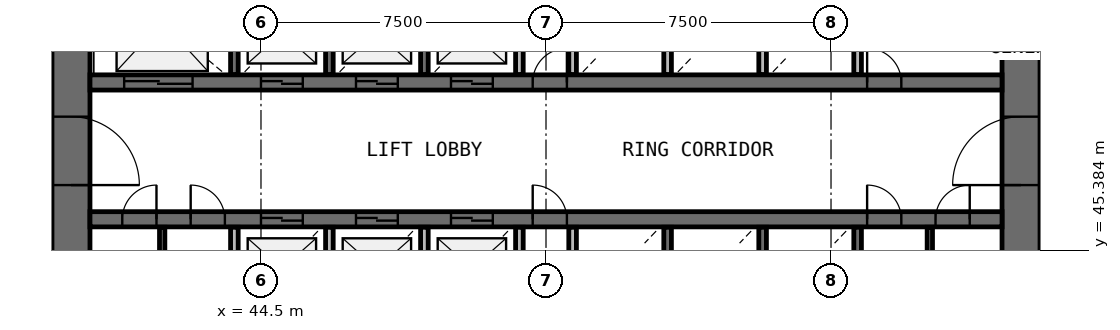
"""IFC4 building model, lengths in metres.
Left out: names, types, materials, properties, quantities, classifications, styles, units other than length and angle.
Written with IfcOpenShell. Run it as: python <this file> out.ifc"""

import sys

from ifc_helpers import new_model, si_unit, direction, frame, frame_2d, origin, place, context, subcontext, project, spatial, rectangle, extrude, source, transform, mapped, element, fill, save


model = new_model("IFC4")
c1 = context("Model", 3, precision=1e-05, world=origin(), true_north=direction((0.0, 1.0)))
c2 = subcontext(c1, "Body", "Model", "MODEL_VIEW")
j1 = project(units=[si_unit("LENGTHUNIT", "METRE"), si_unit("PLANEANGLEUNIT", "RADIAN")], contexts=[c1])
p1 = place(None, origin())
s1 = spatial("IfcSite", under=j1, at=p1, CompositionType="ELEMENT")
p2 = place(p1, origin())
s2 = spatial("IfcBuilding", under=s1, at=p2, CompositionType="ELEMENT")
p3 = place(p2, frame((0.0, 0.0, 57.8)))
s3 = spatial("IfcBuildingStorey", under=s2, at=p3, CompositionType="ELEMENT", Elevation=57.8)
p4 = place(p3, frame((64.5, 38.0, 0.0), z_axis=(0.0, 0.0, 1.0), x_axis=(0.0, 1.0, 0.0)))
e1 = element("IfcWall", 1, at=p4, inside=s3, PredefinedType="SHEAR", context=c2, shape_type="SweptSolid", body=[
    extrude(rectangle(XDim=20.0, YDim=1.0, at=frame_2d((10.0, 0.0))), origin(), (0.0, 0.0, 1.0), 4.4),
])
p5 = place(p4, frame((9.1, 0.0, 0.0)))
e2 = element("IfcOpeningElement", 2, at=p5, cuts=e1, PredefinedType="OPENING", context=c2, shape_type="SweptSolid", body=[
    extrude(rectangle(XDim=1.8, YDim=2.1, at=frame_2d((0.9, 1.05))), frame((0.0, 0.51, 0.0), z_axis=(0.0, -1.0, 0.0), x_axis=(1.0, 0.0, 0.0)), (0.0, 0.0, 1.0), 1.02),
])
p6 = place(p3, frame((39.5, 58.0, 0.0), z_axis=(0.0, 0.0, 1.0), x_axis=(0.0, -1.0, 0.0)))
e3 = element("IfcWall", 3, at=p6, inside=s3, PredefinedType="SHEAR", context=c2, shape_type="SweptSolid", body=[
    extrude(rectangle(XDim=20.0, YDim=1.0, at=frame_2d((10.0, 0.0))), origin(), (0.0, 0.0, 1.0), 4.4),
])
p7 = place(p6, frame((9.1, 0.0, 0.0)))
e4 = element("IfcOpeningElement", 4, at=p7, cuts=e3, PredefinedType="OPENING", context=c2, shape_type="SweptSolid", body=[
    extrude(rectangle(XDim=1.8, YDim=2.1, at=frame_2d((0.9, 1.05))), frame((0.0, 0.51, 0.0), z_axis=(0.0, -1.0, 0.0), x_axis=(1.0, 0.0, 0.0)), (0.0, 0.0, 1.0), 1.02),
])
p8 = place(p3, frame((40.0, 49.8, 0.0), z_axis=(0.0, 0.0, 1.0), x_axis=(1.0, 0.0, 0.0)))
e5 = element("IfcWall", 5, at=p8, inside=s3, PredefinedType="SHEAR", context=c2, shape_type="SweptSolid", body=[
    extrude(rectangle(XDim=24.0, YDim=0.4, at=frame_2d((12.0, 0.0))), origin(), (0.0, 0.0, 1.0), 4.4),
])
p9 = place(p8, frame((4.5, 0.0, 0.0)))
e6 = element("IfcOpeningElement", 6, at=p9, cuts=e5, PredefinedType="OPENING", context=c2, shape_type="SweptSolid", body=[
    extrude(rectangle(XDim=1.1, YDim=2.1, at=frame_2d((0.55, 1.05))), frame((0.0, 0.21, 0.0), z_axis=(0.0, -1.0, 0.0), x_axis=(1.0, 0.0, 0.0)), (0.0, 0.0, 1.0), 0.42),
])
p10 = place(p8, frame((7.0, 0.0, 0.0)))
e7 = element("IfcOpeningElement", 7, at=p10, cuts=e5, PredefinedType="OPENING", context=c2, shape_type="SweptSolid", body=[
    extrude(rectangle(XDim=1.1, YDim=2.1, at=frame_2d((0.55, 1.05))), frame((0.0, 0.21, 0.0), z_axis=(0.0, -1.0, 0.0), x_axis=(1.0, 0.0, 0.0)), (0.0, 0.0, 1.0), 0.42),
])
p11 = place(p8, frame((9.5, 0.0, 0.0)))
e8 = element("IfcOpeningElement", 8, at=p11, cuts=e5, PredefinedType="OPENING", context=c2, shape_type="SweptSolid", body=[
    extrude(rectangle(XDim=1.1, YDim=2.1, at=frame_2d((0.55, 1.05))), frame((0.0, 0.21, 0.0), z_axis=(0.0, -1.0, 0.0), x_axis=(1.0, 0.0, 0.0)), (0.0, 0.0, 1.0), 0.42),
])
p12 = place(p8, frame((0.9, 0.0, 0.0)))
e9 = element("IfcOpeningElement", 9, at=p12, cuts=e5, PredefinedType="OPENING", context=c2, shape_type="SweptSolid", body=[
    extrude(rectangle(XDim=1.8, YDim=2.4, at=frame_2d((0.9, 1.2))), frame((0.0, 0.21, 0.0), z_axis=(0.0, -1.0, 0.0), x_axis=(1.0, 0.0, 0.0)), (0.0, 0.0, 1.0), 0.42),
])
p13 = place(p8, frame((20.45, 0.0, 0.0)))
e10 = element("IfcOpeningElement", 10, at=p13, cuts=e5, PredefinedType="OPENING", context=c2, shape_type="SweptSolid", body=[
    extrude(rectangle(XDim=0.9, YDim=2.1, at=frame_2d((0.45, 1.05))), frame((0.0, 0.21, 0.0), z_axis=(0.0, -1.0, 0.0), x_axis=(1.0, 0.0, 0.0)), (0.0, 0.0, 1.0), 0.42),
])
p14 = place(p8, frame((11.65, 0.0, 0.0)))
e11 = element("IfcOpeningElement", 11, at=p14, cuts=e5, PredefinedType="OPENING", context=c2, shape_type="SweptSolid", body=[
    extrude(rectangle(XDim=0.9, YDim=2.1, at=frame_2d((0.45, 1.05))), frame((0.0, 0.21, 0.0), z_axis=(0.0, -1.0, 0.0), x_axis=(1.0, 0.0, 0.0)), (0.0, 0.0, 1.0), 0.42),
])
p15 = place(p3, frame((40.0, 46.2, 0.0), z_axis=(0.0, 0.0, 1.0), x_axis=(1.0, 0.0, 0.0)))
e12 = element("IfcWall", 12, at=p15, inside=s3, PredefinedType="SHEAR", context=c2, shape_type="SweptSolid", body=[
    extrude(rectangle(XDim=24.0, YDim=0.4, at=frame_2d((12.0, 0.0))), origin(), (0.0, 0.0, 1.0), 4.4),
])
p16 = place(p15, frame((4.5, 0.0, 0.0)))
e13 = element("IfcOpeningElement", 13, at=p16, cuts=e12, PredefinedType="OPENING", context=c2, shape_type="SweptSolid", body=[
    extrude(rectangle(XDim=1.1, YDim=2.1, at=frame_2d((0.55, 1.05))), frame((0.0, 0.21, 0.0), z_axis=(0.0, -1.0, 0.0), x_axis=(1.0, 0.0, 0.0)), (0.0, 0.0, 1.0), 0.42),
])
p17 = place(p15, frame((7.0, 0.0, 0.0)))
e14 = element("IfcOpeningElement", 14, at=p17, cuts=e12, PredefinedType="OPENING", context=c2, shape_type="SweptSolid", body=[
    extrude(rectangle(XDim=1.1, YDim=2.1, at=frame_2d((0.55, 1.05))), frame((0.0, 0.21, 0.0), z_axis=(0.0, -1.0, 0.0), x_axis=(1.0, 0.0, 0.0)), (0.0, 0.0, 1.0), 0.42),
])
p18 = place(p15, frame((9.5, 0.0, 0.0)))
e15 = element("IfcOpeningElement", 15, at=p18, cuts=e12, PredefinedType="OPENING", context=c2, shape_type="SweptSolid", body=[
    extrude(rectangle(XDim=1.1, YDim=2.1, at=frame_2d((0.55, 1.05))), frame((0.0, 0.21, 0.0), z_axis=(0.0, -1.0, 0.0), x_axis=(1.0, 0.0, 0.0)), (0.0, 0.0, 1.0), 0.42),
])
p19 = place(p15, frame((20.45, 0.0, 0.0)))
e16 = element("IfcOpeningElement", 16, at=p19, cuts=e12, PredefinedType="OPENING", context=c2, shape_type="SweptSolid", body=[
    extrude(rectangle(XDim=0.9, YDim=2.1, at=frame_2d((0.45, 1.05))), frame((0.0, 0.21, 0.0), z_axis=(0.0, -1.0, 0.0), x_axis=(1.0, 0.0, 0.0)), (0.0, 0.0, 1.0), 0.42),
])
p20 = place(p15, frame((22.25, 0.0, 0.0)))
e17 = element("IfcOpeningElement", 17, at=p20, cuts=e12, PredefinedType="OPENING", context=c2, shape_type="SweptSolid", body=[
    extrude(rectangle(XDim=0.9, YDim=2.1, at=frame_2d((0.45, 1.05))), frame((0.0, 0.21, 0.0), z_axis=(0.0, -1.0, 0.0), x_axis=(1.0, 0.0, 0.0)), (0.0, 0.0, 1.0), 0.42),
])
p21 = place(p15, frame((0.85, 0.0, 0.0)))
e18 = element("IfcOpeningElement", 18, at=p21, cuts=e12, PredefinedType="OPENING", context=c2, shape_type="SweptSolid", body=[
    extrude(rectangle(XDim=0.9, YDim=2.1, at=frame_2d((0.45, 1.05))), frame((0.0, 0.21, 0.0), z_axis=(0.0, -1.0, 0.0), x_axis=(1.0, 0.0, 0.0)), (0.0, 0.0, 1.0), 0.42),
])
p22 = place(p15, frame((2.65, 0.0, 0.0)))
e19 = element("IfcOpeningElement", 19, at=p22, cuts=e12, PredefinedType="OPENING", context=c2, shape_type="SweptSolid", body=[
    extrude(rectangle(XDim=0.9, YDim=2.1, at=frame_2d((0.45, 1.05))), frame((0.0, 0.21, 0.0), z_axis=(0.0, -1.0, 0.0), x_axis=(1.0, 0.0, 0.0)), (0.0, 0.0, 1.0), 0.42),
])
p23 = place(p15, frame((11.65, 0.0, 0.0)))
e20 = element("IfcOpeningElement", 20, at=p23, cuts=e12, PredefinedType="OPENING", context=c2, shape_type="SweptSolid", body=[
    extrude(rectangle(XDim=0.9, YDim=2.1, at=frame_2d((0.45, 1.05))), frame((0.0, 0.21, 0.0), z_axis=(0.0, -1.0, 0.0), x_axis=(1.0, 0.0, 0.0)), (0.0, 0.0, 1.0), 0.42),
])
for number, where, z_axis, x_axis in (
    (21, (43.8, 45.99, 0.0), (0.0, 0.0, 1.0), (0.0, -1.0, 0.0)),
    (22, (43.8, 52.37, 0.0), (0.0, 0.0, 1.0), (0.0, -1.0, 0.0)),
):
    element("IfcWall", number, at=place(p3, frame(where, z_axis=z_axis, x_axis=x_axis)), inside=s3, PredefinedType="SOLIDWALL", context=c2, shape_type="SweptSolid", body=[
        extrude(rectangle(XDim=2.36, YDim=0.2, at=frame_2d((1.18, 0.0))), origin(), (0.0, 0.0, 1.0), 3.95),
    ])
p24 = place(p3, frame((46.3, 43.6, 0.0), z_axis=(0.0, 0.0, 1.0), x_axis=(0.0, 1.0, 0.0)))
e23 = element("IfcWall", 23, at=p24, inside=s3, PredefinedType="SOLIDWALL", context=c2, shape_type="SweptSolid", body=[
    extrude(rectangle(XDim=2.39, YDim=0.2, at=frame_2d((1.195, 0.0))), origin(), (0.0, 0.0, 1.0), 3.95),
])
for number, where, z_axis, x_axis in (
    (24, (46.3, 50.01, 0.0), (0.0, 0.0, 1.0), (0.0, 1.0, 0.0)),
    (25, (48.8, 43.63, 0.0), (0.0, 0.0, 1.0), (0.0, 1.0, 0.0)),
    (26, (48.8, 50.01, 0.0), (0.0, 0.0, 1.0), (0.0, 1.0, 0.0)),
    (27, (51.3, 43.63, 0.0), (0.0, 0.0, 1.0), (0.0, 1.0, 0.0)),
):
    element("IfcWall", number, at=place(p3, frame(where, z_axis=z_axis, x_axis=x_axis)), inside=s3, PredefinedType="SOLIDWALL", context=c2, shape_type="SweptSolid", body=[
        extrude(rectangle(XDim=2.36, YDim=0.2, at=frame_2d((1.18, 0.0))), origin(), (0.0, 0.0, 1.0), 3.95),
    ])
for number, where, z_axis, x_axis in (
    (28, (51.3, 50.01, 0.0), (0.0, 0.0, 1.0), (0.0, 1.0, 0.0)),
    (29, (52.7, 45.99, 0.0), (0.0, 0.0, 1.0), (0.0, -1.0, 0.0)),
):
    element("IfcWall", number, at=place(p3, frame(where, z_axis=z_axis, x_axis=x_axis)), inside=s3, PredefinedType="SOLIDWALL", context=c2, shape_type="SweptSolid", body=[
        extrude(rectangle(XDim=2.39, YDim=0.2, at=frame_2d((1.195, 0.0))), origin(), (0.0, 0.0, 1.0), 3.95),
    ])
for number, where, z_axis, x_axis in (
    (30, (52.7, 52.37, 0.0), (0.0, 0.0, 1.0), (0.0, -1.0, 0.0)),
    (31, (55.2, 43.63, 0.0), (0.0, 0.0, 1.0), (0.0, 1.0, 0.0)),
    (32, (55.2, 50.01, 0.0), (0.0, 0.0, 1.0), (0.0, 1.0, 0.0)),
    (33, (57.7, 43.63, 0.0), (0.0, 0.0, 1.0), (0.0, 1.0, 0.0)),
):
    element("IfcWall", number, at=place(p3, frame(where, z_axis=z_axis, x_axis=x_axis)), inside=s3, PredefinedType="SOLIDWALL", context=c2, shape_type="SweptSolid", body=[
        extrude(rectangle(XDim=2.36, YDim=0.2, at=frame_2d((1.18, 0.0))), origin(), (0.0, 0.0, 1.0), 3.95),
    ])
p25 = place(p3, frame((57.7, 50.01, 0.0), z_axis=(0.0, 0.0, 1.0), x_axis=(0.0, 1.0, 0.0)))
e34 = element("IfcWall", 34, at=p25, inside=s3, PredefinedType="SOLIDWALL", context=c2, shape_type="SweptSolid", body=[
    extrude(rectangle(XDim=2.39, YDim=0.2, at=frame_2d((1.195, 0.0))), origin(), (0.0, 0.0, 1.0), 3.95),
])
for number, where, z_axis, x_axis in (
    (35, (60.2, 43.63, 0.0), (0.0, 0.0, 1.0), (0.0, 1.0, 0.0)),
    (36, (60.2, 50.01, 0.0), (0.0, 0.0, 1.0), (0.0, 1.0, 0.0)),
):
    element("IfcWall", number, at=place(p3, frame(where, z_axis=z_axis, x_axis=x_axis)), inside=s3, PredefinedType="SOLIDWALL", context=c2, shape_type="SweptSolid", body=[
        extrude(rectangle(XDim=2.36, YDim=0.2, at=frame_2d((1.18, 0.0))), origin(), (0.0, 0.0, 1.0), 3.95),
    ])
for number, where, z_axis, x_axis in (
    (37, (41.9, 43.6, 0.0), (0.0, 0.0, 1.0), (0.0, 1.0, 0.0)),
    (38, (62.1, 43.6, 0.0), (0.0, 0.0, 1.0), (0.0, 1.0, 0.0)),
):
    element("IfcWall", number, at=place(p3, frame(where, z_axis=z_axis, x_axis=x_axis)), inside=s3, PredefinedType="PARTITIONING", context=c2, shape_type="SweptSolid", body=[
        extrude(rectangle(XDim=2.39, YDim=0.14, at=frame_2d((1.195, 0.0))), origin(), (0.0, 0.0, 1.0), 3.05),
    ])
m1 = source(origin(), c2, "Body", "SweptSolid", [
    extrude(rectangle(XDim=1.8, YDim=2.1, at=frame_2d((0.9, 1.05))), frame((0.0, 0.025, 0.0), z_axis=(0.0, -1.0, 0.0), x_axis=(1.0, 0.0, 0.0)), (0.0, 0.0, 1.0), 0.05),
])
p26 = place(p7, origin())
e39 = element("IfcDoor", 39, at=p26, inside=s3, OperationType="SINGLE_SWING_RIGHT", PredefinedType="DOOR", context=c2, shape_type="MappedRepresentation", body=[
    mapped(m1, transform((0.0, 0.0, 0.0), scale=1.0)),
])
fill(e4, e39)
p27 = place(p5, origin())
e40 = element("IfcDoor", 40, at=p27, inside=s3, OperationType="SINGLE_SWING_LEFT", PredefinedType="DOOR", context=c2, shape_type="MappedRepresentation", body=[
    mapped(m1, transform((0.0, 0.0, 0.0), scale=1.0)),
])
fill(e2, e40)
m2 = source(origin(), c2, "Body", "SweptSolid", [
    extrude(rectangle(XDim=1.1, YDim=2.1, at=frame_2d((0.55, 1.05))), frame((0.0, 0.025, 0.0), z_axis=(0.0, -1.0, 0.0), x_axis=(1.0, 0.0, 0.0)), (0.0, 0.0, 1.0), 0.05),
])
p28 = place(p9, origin())
e41 = element("IfcDoor", 41, at=p28, inside=s3, OperationType="DOUBLE_DOOR_SLIDING", PredefinedType="USERDEFINED", context=c2, shape_type="MappedRepresentation", body=[
    mapped(m2, transform((0.0, 0.0, 0.0), scale=1.0)),
])
fill(e6, e41)
p29 = place(p10, origin())
e42 = element("IfcDoor", 42, at=p29, inside=s3, OperationType="DOUBLE_DOOR_SLIDING", PredefinedType="USERDEFINED", context=c2, shape_type="MappedRepresentation", body=[
    mapped(m2, transform((0.0, 0.0, 0.0), scale=1.0)),
])
fill(e7, e42)
p30 = place(p11, origin())
e43 = element("IfcDoor", 43, at=p30, inside=s3, OperationType="DOUBLE_DOOR_SLIDING", PredefinedType="USERDEFINED", context=c2, shape_type="MappedRepresentation", body=[
    mapped(m2, transform((0.0, 0.0, 0.0), scale=1.0)),
])
fill(e8, e43)
p31 = place(p16, origin())
e44 = element("IfcDoor", 44, at=p31, inside=s3, OperationType="DOUBLE_DOOR_SLIDING", PredefinedType="USERDEFINED", context=c2, shape_type="MappedRepresentation", body=[
    mapped(m2, transform((0.0, 0.0, 0.0), scale=1.0)),
])
fill(e13, e44)
p32 = place(p17, origin())
e45 = element("IfcDoor", 45, at=p32, inside=s3, OperationType="DOUBLE_DOOR_SLIDING", PredefinedType="USERDEFINED", context=c2, shape_type="MappedRepresentation", body=[
    mapped(m2, transform((0.0, 0.0, 0.0), scale=1.0)),
])
fill(e14, e45)
p33 = place(p18, origin())
e46 = element("IfcDoor", 46, at=p33, inside=s3, OperationType="DOUBLE_DOOR_SLIDING", PredefinedType="USERDEFINED", context=c2, shape_type="MappedRepresentation", body=[
    mapped(m2, transform((0.0, 0.0, 0.0), scale=1.0)),
])
fill(e15, e46)
m3 = source(origin(), c2, "Body", "SweptSolid", [
    extrude(rectangle(XDim=1.8, YDim=2.4, at=frame_2d((0.9, 1.2))), frame((0.0, 0.025, 0.0), z_axis=(0.0, -1.0, 0.0), x_axis=(1.0, 0.0, 0.0)), (0.0, 0.0, 1.0), 0.05),
])
p34 = place(p12, origin())
e47 = element("IfcDoor", 47, at=p34, inside=s3, OperationType="DOUBLE_DOOR_SLIDING", PredefinedType="USERDEFINED", context=c2, shape_type="MappedRepresentation", body=[
    mapped(m3, transform((0.0, 0.0, 0.0), scale=1.0)),
])
fill(e9, e47)
m4 = source(origin(), c2, "Body", "SweptSolid", [
    extrude(rectangle(XDim=0.9, YDim=2.1, at=frame_2d((0.45, 1.05))), frame((0.0, 0.025, 0.0), z_axis=(0.0, -1.0, 0.0), x_axis=(1.0, 0.0, 0.0)), (0.0, 0.0, 1.0), 0.05),
])
p35 = place(p19, origin())
e48 = element("IfcDoor", 48, at=p35, inside=s3, OperationType="SINGLE_SWING_LEFT", PredefinedType="DOOR", context=c2, shape_type="MappedRepresentation", body=[
    mapped(m4, transform((0.0, 0.0, 0.0), scale=1.0)),
])
fill(e16, e48)
p36 = place(p20, origin())
e49 = element("IfcDoor", 49, at=p36, inside=s3, OperationType="SINGLE_SWING_RIGHT", PredefinedType="DOOR", context=c2, shape_type="MappedRepresentation", body=[
    mapped(m4, transform((0.0, 0.0, 0.0), scale=1.0)),
])
fill(e17, e49)
p37 = place(p13, origin())
e50 = element("IfcDoor", 50, at=p37, inside=s3, OperationType="SINGLE_SWING_LEFT", PredefinedType="DOOR", context=c2, shape_type="MappedRepresentation", body=[
    mapped(m4, transform((0.0, 0.0, 0.0), scale=1.0)),
])
fill(e10, e50)
p38 = place(p21, origin())
e51 = element("IfcDoor", 51, at=p38, inside=s3, OperationType="SINGLE_SWING_RIGHT", PredefinedType="DOOR", context=c2, shape_type="MappedRepresentation", body=[
    mapped(m4, transform((0.0, 0.0, 0.0), scale=1.0)),
])
fill(e18, e51)
p39 = place(p22, origin())
e52 = element("IfcDoor", 52, at=p39, inside=s3, OperationType="SINGLE_SWING_LEFT", PredefinedType="DOOR", context=c2, shape_type="MappedRepresentation", body=[
    mapped(m4, transform((0.0, 0.0, 0.0), scale=1.0)),
])
fill(e19, e52)
p40 = place(p14, origin())
e53 = element("IfcDoor", 53, at=p40, inside=s3, OperationType="SINGLE_SWING_RIGHT", PredefinedType="DOOR", context=c2, shape_type="MappedRepresentation", body=[
    mapped(m4, transform((0.0, 0.0, 0.0), scale=1.0)),
])
fill(e11, e53)
p41 = place(p23, origin())
e54 = element("IfcDoor", 54, at=p41, inside=s3, OperationType="SINGLE_SWING_LEFT", PredefinedType="DOOR", context=c2, shape_type="MappedRepresentation", body=[
    mapped(m4, transform((0.0, 0.0, 0.0), scale=1.0)),
])
fill(e20, e54)
save(model, sys.argv[1])
